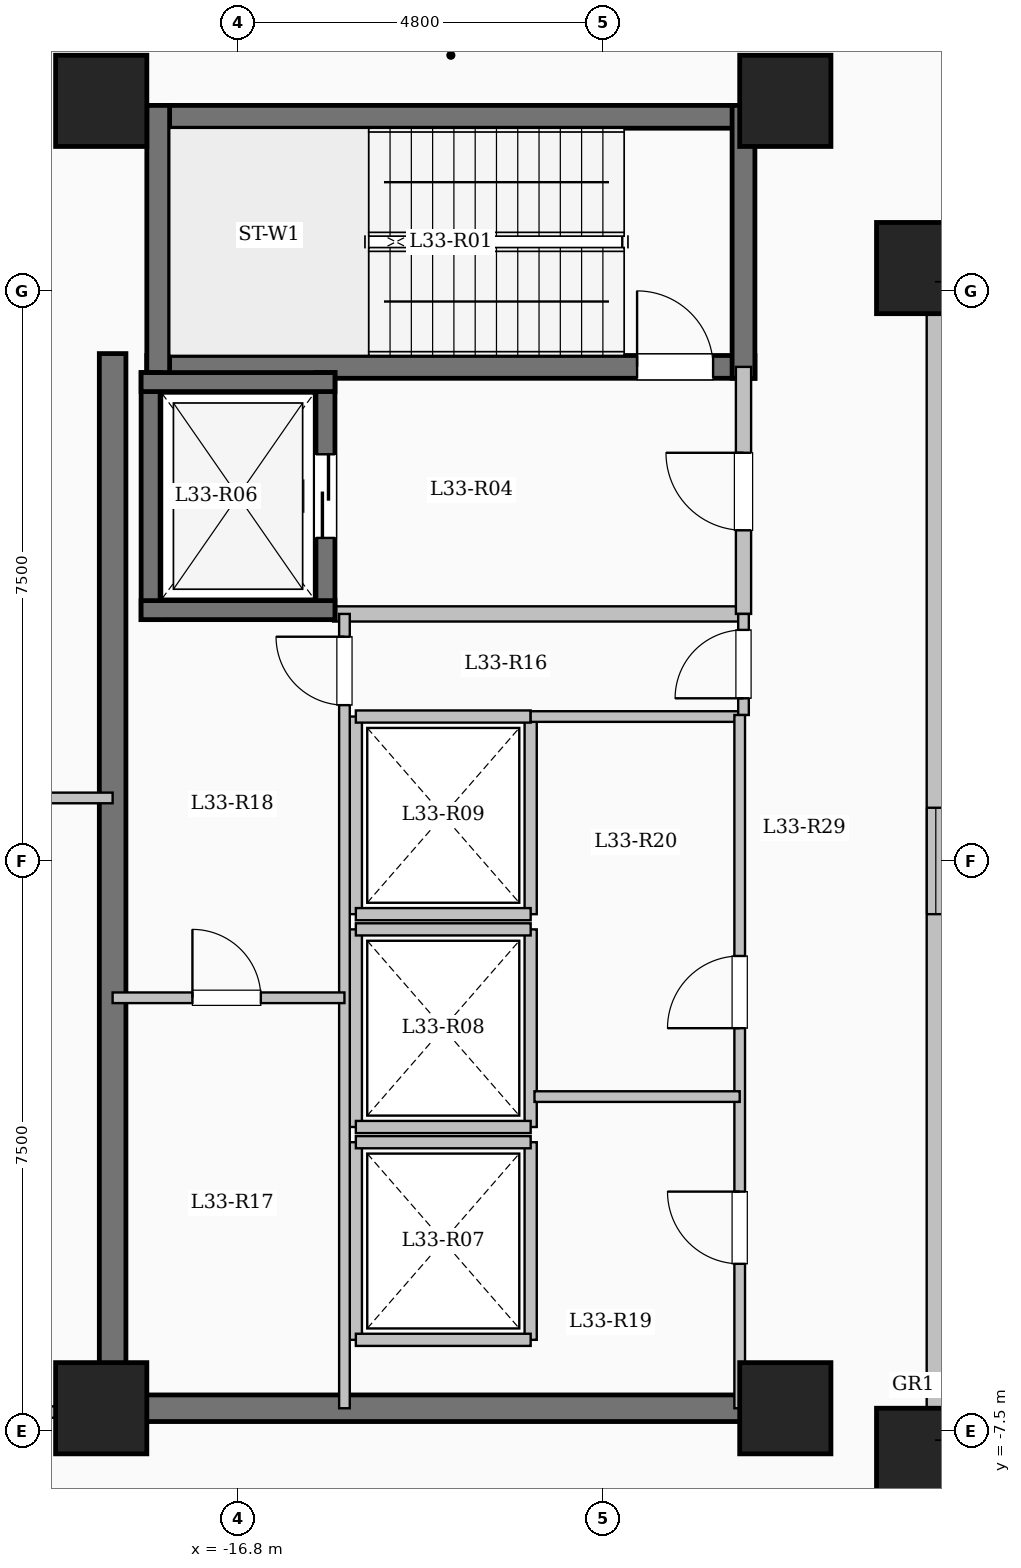
"""IFC4 building model, lengths in metres.
Left out: names, types, materials, properties, quantities, classifications, styles, units other than length and angle.
Written with IfcOpenShell. Run it as: python <this file> out.ifc"""

import sys

from ifc_helpers import new_model, si_unit, direction, frame, frame_2d, origin, origin_2d, place, context, subcontext, project, spatial, rectangle, extrude, element, fill, save


model = new_model("IFC4")
c1 = context("Model", 3, precision=1e-05, world=origin(), true_north=direction((0.0, 1.0)))
c2 = subcontext(c1, "Body", "Model", "MODEL_VIEW")
j1 = project(units=[si_unit("LENGTHUNIT", "METRE"), si_unit("PLANEANGLEUNIT", "RADIAN")], contexts=[c1])
p1 = place(None, origin())
s1 = spatial("IfcSite", under=j1, at=p1, CompositionType="ELEMENT")
p2 = place(p1, origin())
s2 = spatial("IfcBuilding", under=s1, at=p2, CompositionType="ELEMENT")
p3 = place(p2, frame((0.0, 0.0, 123.0)))
s3 = spatial("IfcBuildingStorey", under=s2, at=p3, CompositionType="ELEMENT", Elevation=123.0)
for number, where, z_axis, x_axis in (
    (1, (-7.8, -7.8, 0.0), (0.0, 0.0, 1.0), (1.0, 0.0, 0.0)),
    (2, (-7.8, 7.8, 0.0), (0.0, 0.0, 1.0), (1.0, 0.0, 0.0)),
    (3, (-9.6, -7.2, 0.0), (0.0, 0.0, 1.0), (1.0, 0.0, 0.0)),
    (4, (-9.6, 10.0, 0.0), (0.0, 0.0, 1.0), (1.0, 0.0, 0.0)),
    (5, (-18.6, -7.2, 0.0), (0.0, 0.0, 1.0), (1.0, 0.0, 0.0)),
    (6, (-18.6, 10.0, 0.0), (0.0, 0.0, 1.0), (1.0, 0.0, 0.0)),
):
    element("IfcColumn", number, at=place(p3, frame(where, z_axis=z_axis, x_axis=x_axis)), inside=s3, PredefinedType="COLUMN", context=c2, shape_type="SweptSolid", body=[
        extrude(rectangle(XDim=1.2, YDim=1.2, at=origin_2d()), origin(), (0.0, 0.0, 1.0), 4.5),
    ])
p4 = place(p3, frame((-7.62, 7.62, 0.0), z_axis=(0.0, 0.0, 1.0), x_axis=(0.0, -1.0, 0.0)))
e7 = element("IfcWall", 7, at=p4, inside=s3, PredefinedType="SOLIDWALL", context=c2, shape_type="SweptSolid", body=[
    extrude(rectangle(XDim=15.24, YDim=0.24, at=frame_2d((7.62, 0.0))), origin(), (0.0, 0.0, 1.0), 4.2),
])
p5 = place(p4, frame((6.92, 0.0, 0.95)))
e8 = element("IfcOpeningElement", 8, at=p5, cuts=e7, PredefinedType="OPENING", context=c2, shape_type="SweptSolid", body=[
    extrude(rectangle(XDim=1.4, YDim=1.5, at=frame_2d((0.7, 0.75))), frame((0.0, 0.13, 0.0), z_axis=(0.0, -1.0, 0.0), x_axis=(1.0, 0.0, 0.0)), (0.0, 0.0, 1.0), 0.26),
])
p6 = place(p3, frame((-18.0, 9.79, 0.0), z_axis=(0.0, 0.0, 1.0), x_axis=(1.0, 0.0, 0.0)))
e9 = element("IfcWall", 9, at=p6, inside=s3, PredefinedType="SHEAR", context=c2, shape_type="SweptSolid", body=[
    extrude(rectangle(XDim=8.0, YDim=0.3, at=frame_2d((4.0, 0.0))), origin(), (0.0, 0.0, 1.0), 4.5),
])
p7 = place(p3, frame((-18.0, 6.5, 0.0), z_axis=(0.0, 0.0, 1.0), x_axis=(1.0, 0.0, 0.0)))
e10 = element("IfcWall", 10, at=p7, inside=s3, PredefinedType="SHEAR", context=c2, shape_type="SweptSolid", body=[
    extrude(rectangle(XDim=8.0, YDim=0.3, at=frame_2d((4.0, 0.0))), origin(), (0.0, 0.0, 1.0), 4.5),
])
p8 = place(p7, frame((6.45, 0.0, 0.0)))
e11 = element("IfcOpeningElement", 11, at=p8, cuts=e10, PredefinedType="OPENING", context=c2, shape_type="SweptSolid", body=[
    extrude(rectangle(XDim=1.0, YDim=2.15, at=frame_2d((0.5, 1.075))), frame((0.0, 0.16, 0.0), z_axis=(0.0, -1.0, 0.0), x_axis=(1.0, 0.0, 0.0)), (0.0, 0.0, 1.0), 0.32),
])
for number, where, z_axis, x_axis in (
    (12, (-17.85, 6.35, 0.0), (0.0, 0.0, 1.0), (0.0, 1.0, 0.0)),
    (13, (-10.15, 6.35, 0.0), (0.0, 0.0, 1.0), (0.0, 1.0, 0.0)),
):
    element("IfcWall", number, at=place(p3, frame(where, z_axis=z_axis, x_axis=x_axis)), inside=s3, PredefinedType="SHEAR", context=c2, shape_type="SweptSolid", body=[
        extrude(rectangle(XDim=3.59, YDim=0.3, at=frame_2d((1.795, 0.0))), origin(), (0.0, 0.0, 1.0), 4.5),
    ])
p9 = place(p3, frame((-15.55, 3.25, 0.0), z_axis=(0.0, 0.0, 1.0), x_axis=(1.0, 0.0, 0.0)))
e14 = element("IfcWall", 14, at=p9, inside=s3, PredefinedType="SOLIDWALL", context=c2, shape_type="SweptSolid", body=[
    extrude(rectangle(XDim=5.4, YDim=0.2, at=frame_2d((2.7, 0.0))), origin(), (0.0, 0.0, 1.0), 4.2),
])
p10 = place(p3, frame((-10.15, 3.25, 0.0), z_axis=(0.0, 0.0, 1.0), x_axis=(0.0, 1.0, 0.0)))
e15 = element("IfcWall", 15, at=p10, inside=s3, PredefinedType="SOLIDWALL", context=c2, shape_type="SweptSolid", body=[
    extrude(rectangle(XDim=3.25, YDim=0.2, at=frame_2d((1.625, 0.0))), origin(), (0.0, 0.0, 1.0), 4.2),
])
p11 = place(p10, frame((1.1, 0.0, 0.0)))
e16 = element("IfcOpeningElement", 16, at=p11, cuts=e15, PredefinedType="OPENING", context=c2, shape_type="SweptSolid", body=[
    extrude(rectangle(XDim=1.02, YDim=2.15, at=frame_2d((0.51, 1.075))), frame((0.0, 0.11, 0.0), z_axis=(0.0, -1.0, 0.0), x_axis=(1.0, 0.0, 0.0)), (0.0, 0.0, 1.0), 0.22),
])
p12 = place(p3, frame((-17.95, 3.175, 0.0), z_axis=(0.0, 0.0, 1.0), x_axis=(0.0, 1.0, 0.0)))
e17 = element("IfcWall", 17, at=p12, inside=s3, PredefinedType="SHEAR", context=c2, shape_type="SweptSolid", body=[
    extrude(rectangle(XDim=3.25, YDim=0.25, at=frame_2d((1.625, 0.0))), origin(), (0.0, 0.0, 1.0), 4.5),
])
p13 = place(p3, frame((-15.65, 3.175, 0.0), z_axis=(0.0, 0.0, 1.0), x_axis=(0.0, 1.0, 0.0)))
e18 = element("IfcWall", 18, at=p13, inside=s3, PredefinedType="SHEAR", context=c2, shape_type="SweptSolid", body=[
    extrude(rectangle(XDim=3.25, YDim=0.25, at=frame_2d((1.625, 0.0))), origin(), (0.0, 0.0, 1.0), 4.5),
])
p14 = place(p13, frame((1.075, 0.0, 0.0)))
e19 = element("IfcOpeningElement", 19, at=p14, cuts=e18, PredefinedType="OPENING", context=c2, shape_type="SweptSolid", body=[
    extrude(rectangle(XDim=1.1, YDim=2.15, at=frame_2d((0.55, 1.075))), frame((0.0, 0.135, 0.0), z_axis=(0.0, -1.0, 0.0), x_axis=(1.0, 0.0, 0.0)), (0.0, 0.0, 1.0), 0.27),
])
for number, where, z_axis, x_axis in (
    (20, (-18.075, 3.3, 0.0), (0.0, 0.0, 1.0), (1.0, 0.0, 0.0)),
    (21, (-18.075, 6.3, 0.0), (0.0, 0.0, 1.0), (1.0, 0.0, 0.0)),
):
    element("IfcWall", number, at=place(p3, frame(where, z_axis=z_axis, x_axis=x_axis)), inside=s3, PredefinedType="SHEAR", context=c2, shape_type="SweptSolid", body=[
        extrude(rectangle(XDim=2.55, YDim=0.25, at=frame_2d((1.275, 0.0))), origin(), (0.0, 0.0, 1.0), 4.5),
    ])
for number, where, z_axis, x_axis in (
    (22, (-15.25, -6.3, 0.0), (0.0, 0.0, 1.0), (0.0, 1.0, 0.0)),
    (23, (-12.95, -6.3, 0.0), (0.0, 0.0, 1.0), (0.0, 1.0, 0.0)),
):
    element("IfcWall", number, at=place(p3, frame(where, z_axis=z_axis, x_axis=x_axis)), inside=s3, PredefinedType="SOLIDWALL", context=c2, shape_type="SweptSolid", body=[
        extrude(rectangle(XDim=2.6, YDim=0.16, at=frame_2d((1.3, 0.0))), origin(), (0.0, 0.0, 1.0), 4.2),
    ])
for number, where, z_axis, x_axis in (
    (24, (-15.25, -6.3, 0.0), (0.0, 0.0, 1.0), (1.0, 0.0, 0.0)),
    (25, (-15.25, -3.7, 0.0), (0.0, 0.0, 1.0), (1.0, 0.0, 0.0)),
):
    element("IfcWall", number, at=place(p3, frame(where, z_axis=z_axis, x_axis=x_axis)), inside=s3, PredefinedType="SOLIDWALL", context=c2, shape_type="SweptSolid", body=[
        extrude(rectangle(XDim=2.3, YDim=0.16, at=frame_2d((1.15, 0.0))), origin(), (0.0, 0.0, 1.0), 4.2),
    ])
for number, where, z_axis, x_axis in (
    (26, (-15.25, -3.5, 0.0), (0.0, 0.0, 1.0), (0.0, 1.0, 0.0)),
    (27, (-12.95, -3.5, 0.0), (0.0, 0.0, 1.0), (0.0, 1.0, 0.0)),
):
    element("IfcWall", number, at=place(p3, frame(where, z_axis=z_axis, x_axis=x_axis)), inside=s3, PredefinedType="SOLIDWALL", context=c2, shape_type="SweptSolid", body=[
        extrude(rectangle(XDim=2.6, YDim=0.16, at=frame_2d((1.3, 0.0))), origin(), (0.0, 0.0, 1.0), 4.2),
    ])
for number, where, z_axis, x_axis in (
    (28, (-15.25, -3.5, 0.0), (0.0, 0.0, 1.0), (1.0, 0.0, 0.0)),
    (29, (-15.25, -0.9, 0.0), (0.0, 0.0, 1.0), (1.0, 0.0, 0.0)),
):
    element("IfcWall", number, at=place(p3, frame(where, z_axis=z_axis, x_axis=x_axis)), inside=s3, PredefinedType="SOLIDWALL", context=c2, shape_type="SweptSolid", body=[
        extrude(rectangle(XDim=2.3, YDim=0.16, at=frame_2d((1.15, 0.0))), origin(), (0.0, 0.0, 1.0), 4.2),
    ])
for number, where, z_axis, x_axis in (
    (30, (-15.25, -0.7, 0.0), (0.0, 0.0, 1.0), (0.0, 1.0, 0.0)),
    (31, (-12.95, -0.7, 0.0), (0.0, 0.0, 1.0), (0.0, 1.0, 0.0)),
):
    element("IfcWall", number, at=place(p3, frame(where, z_axis=z_axis, x_axis=x_axis)), inside=s3, PredefinedType="SOLIDWALL", context=c2, shape_type="SweptSolid", body=[
        extrude(rectangle(XDim=2.6, YDim=0.16, at=frame_2d((1.3, 0.0))), origin(), (0.0, 0.0, 1.0), 4.2),
    ])
for number, where, z_axis, x_axis in (
    (32, (-15.25, -0.7, 0.0), (0.0, 0.0, 1.0), (1.0, 0.0, 0.0)),
    (33, (-15.25, 1.9, 0.0), (0.0, 0.0, 1.0), (1.0, 0.0, 0.0)),
):
    element("IfcWall", number, at=place(p3, frame(where, z_axis=z_axis, x_axis=x_axis)), inside=s3, PredefinedType="SOLIDWALL", context=c2, shape_type="SweptSolid", body=[
        extrude(rectangle(XDim=2.3, YDim=0.16, at=frame_2d((1.15, 0.0))), origin(), (0.0, 0.0, 1.0), 4.2),
    ])
p15 = place(p3, frame((-18.45, -7.375, 0.0), z_axis=(0.0, 0.0, 1.0), x_axis=(0.0, 1.0, 0.0)))
e34 = element("IfcWall", 34, at=p15, inside=s3, PredefinedType="SHEAR", context=c2, shape_type="SweptSolid", body=[
    extrude(rectangle(XDim=14.05, YDim=0.35, at=frame_2d((7.025, 0.0))), origin(), (0.0, 0.0, 1.0), 4.5),
])
p16 = place(p3, frame((-18.625, -7.2, 0.0), z_axis=(0.0, 0.0, 1.0), x_axis=(1.0, 0.0, 0.0)))
e35 = element("IfcWall", 35, at=p16, inside=s3, PredefinedType="SHEAR", context=c2, shape_type="SweptSolid", body=[
    extrude(rectangle(XDim=8.55, YDim=0.35, at=frame_2d((4.275, 0.0))), origin(), (0.0, 0.0, 1.0), 4.5),
])
p17 = place(p3, frame((-12.95, 1.9, 0.0), z_axis=(0.0, 0.0, 1.0), x_axis=(1.0, 0.0, 0.0)))
e36 = element("IfcWall", 36, at=p17, inside=s3, PredefinedType="PARTITIONING", context=c2, shape_type="SweptSolid", body=[
    extrude(rectangle(XDim=2.8, YDim=0.14, at=frame_2d((1.4, 0.0))), origin(), (0.0, 0.0, 1.0), 4.2),
])
p18 = place(p3, frame((-10.15, 1.92, 0.0), z_axis=(0.0, 0.0, 1.0), x_axis=(0.0, 1.0, 0.0)))
e37 = element("IfcWall", 37, at=p18, inside=s3, PredefinedType="PARTITIONING", context=c2, shape_type="SweptSolid", body=[
    extrude(rectangle(XDim=1.33, YDim=0.14, at=frame_2d((0.665, 0.0))), origin(), (0.0, 0.0, 1.0), 4.2),
])
p19 = place(p18, frame((0.22, 0.0, 0.0)))
e38 = element("IfcOpeningElement", 38, at=p19, cuts=e37, PredefinedType="OPENING", context=c2, shape_type="SweptSolid", body=[
    extrude(rectangle(XDim=0.9, YDim=2.08, at=frame_2d((0.45, 1.04))), frame((0.0, 0.08, 0.0), z_axis=(0.0, -1.0, 0.0), x_axis=(1.0, 0.0, 0.0)), (0.0, 0.0, 1.0), 0.16),
])
p20 = place(p3, frame((-15.4, -7.2, 0.0), z_axis=(0.0, 0.0, 1.0), x_axis=(0.0, 1.0, 0.0)))
e39 = element("IfcWall", 39, at=p20, inside=s3, PredefinedType="PARTITIONING", context=c2, shape_type="SweptSolid", body=[
    extrude(rectangle(XDim=10.45, YDim=0.14, at=frame_2d((5.225, 0.0))), origin(), (0.0, 0.0, 1.0), 4.2),
])
p21 = place(p20, frame((9.25, 0.0, 0.0)))
e40 = element("IfcOpeningElement", 40, at=p21, cuts=e39, PredefinedType="OPENING", context=c2, shape_type="SweptSolid", body=[
    extrude(rectangle(XDim=0.9, YDim=2.08, at=frame_2d((0.45, 1.04))), frame((0.0, 0.08, 0.0), z_axis=(0.0, -1.0, 0.0), x_axis=(1.0, 0.0, 0.0)), (0.0, 0.0, 1.0), 0.16),
])
p22 = place(p3, frame((-18.45, -1.8, 0.0), z_axis=(0.0, 0.0, 1.0), x_axis=(1.0, 0.0, 0.0)))
e41 = element("IfcWall", 41, at=p22, inside=s3, PredefinedType="PARTITIONING", context=c2, shape_type="SweptSolid", body=[
    extrude(rectangle(XDim=3.05, YDim=0.14, at=frame_2d((1.525, 0.0))), origin(), (0.0, 0.0, 1.0), 4.2),
])
p23 = place(p22, frame((1.05, 0.0, 0.0)))
e42 = element("IfcOpeningElement", 42, at=p23, cuts=e41, PredefinedType="OPENING", context=c2, shape_type="SweptSolid", body=[
    extrude(rectangle(XDim=0.9, YDim=2.08, at=frame_2d((0.45, 1.04))), frame((0.0, 0.08, 0.0), z_axis=(0.0, -1.0, 0.0), x_axis=(1.0, 0.0, 0.0)), (0.0, 0.0, 1.0), 0.16),
])
p24 = place(p3, frame((-10.2, -7.2, 0.0), z_axis=(0.0, 0.0, 1.0), x_axis=(0.0, 1.0, 0.0)))
e43 = element("IfcWall", 43, at=p24, inside=s3, PredefinedType="PARTITIONING", context=c2, shape_type="SweptSolid", body=[
    extrude(rectangle(XDim=9.12, YDim=0.14, at=frame_2d((4.56, 0.0))), origin(), (0.0, 0.0, 1.0), 4.2),
])
p25 = place(p24, frame((1.9, 0.0, 0.0)))
e44 = element("IfcOpeningElement", 44, at=p25, cuts=e43, PredefinedType="OPENING", context=c2, shape_type="SweptSolid", body=[
    extrude(rectangle(XDim=0.95, YDim=2.12, at=frame_2d((0.475, 1.06))), frame((0.0, 0.08, 0.0), z_axis=(0.0, -1.0, 0.0), x_axis=(1.0, 0.0, 0.0)), (0.0, 0.0, 1.0), 0.16),
])
p26 = place(p24, frame((5.0, 0.0, 0.0)))
e45 = element("IfcOpeningElement", 45, at=p26, cuts=e43, PredefinedType="OPENING", context=c2, shape_type="SweptSolid", body=[
    extrude(rectangle(XDim=0.95, YDim=2.12, at=frame_2d((0.475, 1.06))), frame((0.0, 0.08, 0.0), z_axis=(0.0, -1.0, 0.0), x_axis=(1.0, 0.0, 0.0)), (0.0, 0.0, 1.0), 0.16),
])
p27 = place(p3, frame((-12.9, -3.1, 0.0), z_axis=(0.0, 0.0, 1.0), x_axis=(1.0, 0.0, 0.0)))
e46 = element("IfcWall", 46, at=p27, inside=s3, PredefinedType="PARTITIONING", context=c2, shape_type="SweptSolid", body=[
    extrude(rectangle(XDim=2.7, YDim=0.14, at=frame_2d((1.35, 0.0))), origin(), (0.0, 0.0, 1.0), 4.2),
])
p28 = place(p3, frame((-26.88, -7.25, 0.0), z_axis=(0.0, 0.0, 1.0), x_axis=(1.0, 0.0, 0.0)))
e47 = element("IfcWall", 47, at=p28, inside=s3, PredefinedType="PARTITIONING", context=c2, shape_type="SweptSolid", body=[
    extrude(rectangle(XDim=8.43, YDim=0.15, at=frame_2d((4.215, 0.0))), origin(), (0.0, 0.0, 1.0), 4.2),
])
p29 = place(p28, frame((5.23, 0.0, 0.0)))
e48 = element("IfcOpeningElement", 48, at=p29, cuts=e47, PredefinedType="OPENING", context=c2, shape_type="SweptSolid", body=[
    extrude(rectangle(XDim=1.08, YDim=2.15, at=frame_2d((0.54, 1.075))), frame((0.0, 0.085, 0.0), z_axis=(0.0, -1.0, 0.0), x_axis=(1.0, 0.0, 0.0)), (0.0, 0.0, 1.0), 0.17),
])
p30 = place(p3, frame((-26.88, 0.829, 0.0), z_axis=(0.0, 0.0, 1.0), x_axis=(1.0, 0.0, 0.0)))
e49 = element("IfcWall", 49, at=p30, inside=s3, PredefinedType="PARTITIONING", context=c2, shape_type="SweptSolid", body=[
    extrude(rectangle(XDim=8.43, YDim=0.14, at=frame_2d((4.215, 0.0))), origin(), (0.0, 0.0, 1.0), 4.2),
])
p31 = place(p30, frame((6.28, 0.0, 0.0)))
e50 = element("IfcOpeningElement", 50, at=p31, cuts=e49, PredefinedType="OPENING", context=c2, shape_type="SweptSolid", body=[
    extrude(rectangle(XDim=1.08, YDim=2.15, at=frame_2d((0.54, 1.075))), frame((0.0, 0.08, 0.0), z_axis=(0.0, -1.0, 0.0), x_axis=(1.0, 0.0, 0.0)), (0.0, 0.0, 1.0), 0.16),
])
p32 = place(p5, origin())
e51 = element("IfcWindow", 51, at=p32, inside=s3, PartitioningType="SINGLE_PANEL", PredefinedType="WINDOW", context=c2, shape_type="SweptSolid", body=[
    extrude(rectangle(XDim=1.4, YDim=1.5, at=frame_2d((0.7, 0.75))), frame((0.0, 0.03, 0.0), z_axis=(0.0, -1.0, 0.0), x_axis=(1.0, 0.0, 0.0)), (0.0, 0.0, 1.0), 0.06),
])
fill(e8, e51)
p33 = place(p8, origin())
e52 = element("IfcDoor", 52, at=p33, inside=s3, OperationType="SINGLE_SWING_LEFT", PredefinedType="DOOR", context=c2, shape_type="SweptSolid", body=[
    extrude(rectangle(XDim=1.0, YDim=2.15, at=frame_2d((0.5, 1.075))), frame((0.0, 0.025, 0.0), z_axis=(0.0, -1.0, 0.0), x_axis=(1.0, 0.0, 0.0)), (0.0, 0.0, 1.0), 0.05),
])
fill(e11, e52)
p34 = place(p11, origin())
e53 = element("IfcDoor", 53, at=p34, inside=s3, OperationType="SINGLE_SWING_RIGHT", PredefinedType="DOOR", context=c2, shape_type="SweptSolid", body=[
    extrude(rectangle(XDim=1.02, YDim=2.15, at=frame_2d((0.51, 1.075))), frame((0.0, 0.025, 0.0), z_axis=(0.0, -1.0, 0.0), x_axis=(1.0, 0.0, 0.0)), (0.0, 0.0, 1.0), 0.05),
])
fill(e16, e53)
p35 = place(p14, origin())
e54 = element("IfcDoor", 54, at=p35, inside=s3, OperationType="SLIDING_TO_LEFT", PredefinedType="DOOR", context=c2, shape_type="SweptSolid", body=[
    extrude(rectangle(XDim=1.1, YDim=2.15, at=frame_2d((0.55, 1.075))), frame((0.0, 0.025, 0.0), z_axis=(0.0, -1.0, 0.0), x_axis=(1.0, 0.0, 0.0)), (0.0, 0.0, 1.0), 0.05),
])
fill(e19, e54)
p36 = place(p19, origin())
e55 = element("IfcDoor", 55, at=p36, inside=s3, OperationType="SINGLE_SWING_LEFT", PredefinedType="DOOR", context=c2, shape_type="SweptSolid", body=[
    extrude(rectangle(XDim=0.9, YDim=2.08, at=frame_2d((0.45, 1.04))), frame((0.0, 0.025, 0.0), z_axis=(0.0, -1.0, 0.0), x_axis=(1.0, 0.0, 0.0)), (0.0, 0.0, 1.0), 0.05),
])
fill(e38, e55)
p37 = place(p21, origin())
e56 = element("IfcDoor", 56, at=p37, inside=s3, OperationType="SINGLE_SWING_RIGHT", PredefinedType="DOOR", context=c2, shape_type="SweptSolid", body=[
    extrude(rectangle(XDim=0.9, YDim=2.08, at=frame_2d((0.45, 1.04))), frame((0.0, 0.025, 0.0), z_axis=(0.0, -1.0, 0.0), x_axis=(1.0, 0.0, 0.0)), (0.0, 0.0, 1.0), 0.05),
])
fill(e40, e56)
p38 = place(p23, origin())
e57 = element("IfcDoor", 57, at=p38, inside=s3, OperationType="SINGLE_SWING_LEFT", PredefinedType="DOOR", context=c2, shape_type="SweptSolid", body=[
    extrude(rectangle(XDim=0.9, YDim=2.08, at=frame_2d((0.45, 1.04))), frame((0.0, 0.025, 0.0), z_axis=(0.0, -1.0, 0.0), x_axis=(1.0, 0.0, 0.0)), (0.0, 0.0, 1.0), 0.05),
])
fill(e42, e57)
p39 = place(p25, origin())
e58 = element("IfcDoor", 58, at=p39, inside=s3, OperationType="SINGLE_SWING_RIGHT", PredefinedType="DOOR", context=c2, shape_type="SweptSolid", body=[
    extrude(rectangle(XDim=0.95, YDim=2.12, at=frame_2d((0.475, 1.06))), frame((0.0, 0.025, 0.0), z_axis=(0.0, -1.0, 0.0), x_axis=(1.0, 0.0, 0.0)), (0.0, 0.0, 1.0), 0.05),
])
fill(e44, e58)
p40 = place(p26, origin())
e59 = element("IfcDoor", 59, at=p40, inside=s3, OperationType="SINGLE_SWING_LEFT", PredefinedType="DOOR", context=c2, shape_type="SweptSolid", body=[
    extrude(rectangle(XDim=0.95, YDim=2.12, at=frame_2d((0.475, 1.06))), frame((0.0, 0.025, 0.0), z_axis=(0.0, -1.0, 0.0), x_axis=(1.0, 0.0, 0.0)), (0.0, 0.0, 1.0), 0.05),
])
fill(e45, e59)
save(model, sys.argv[1])
